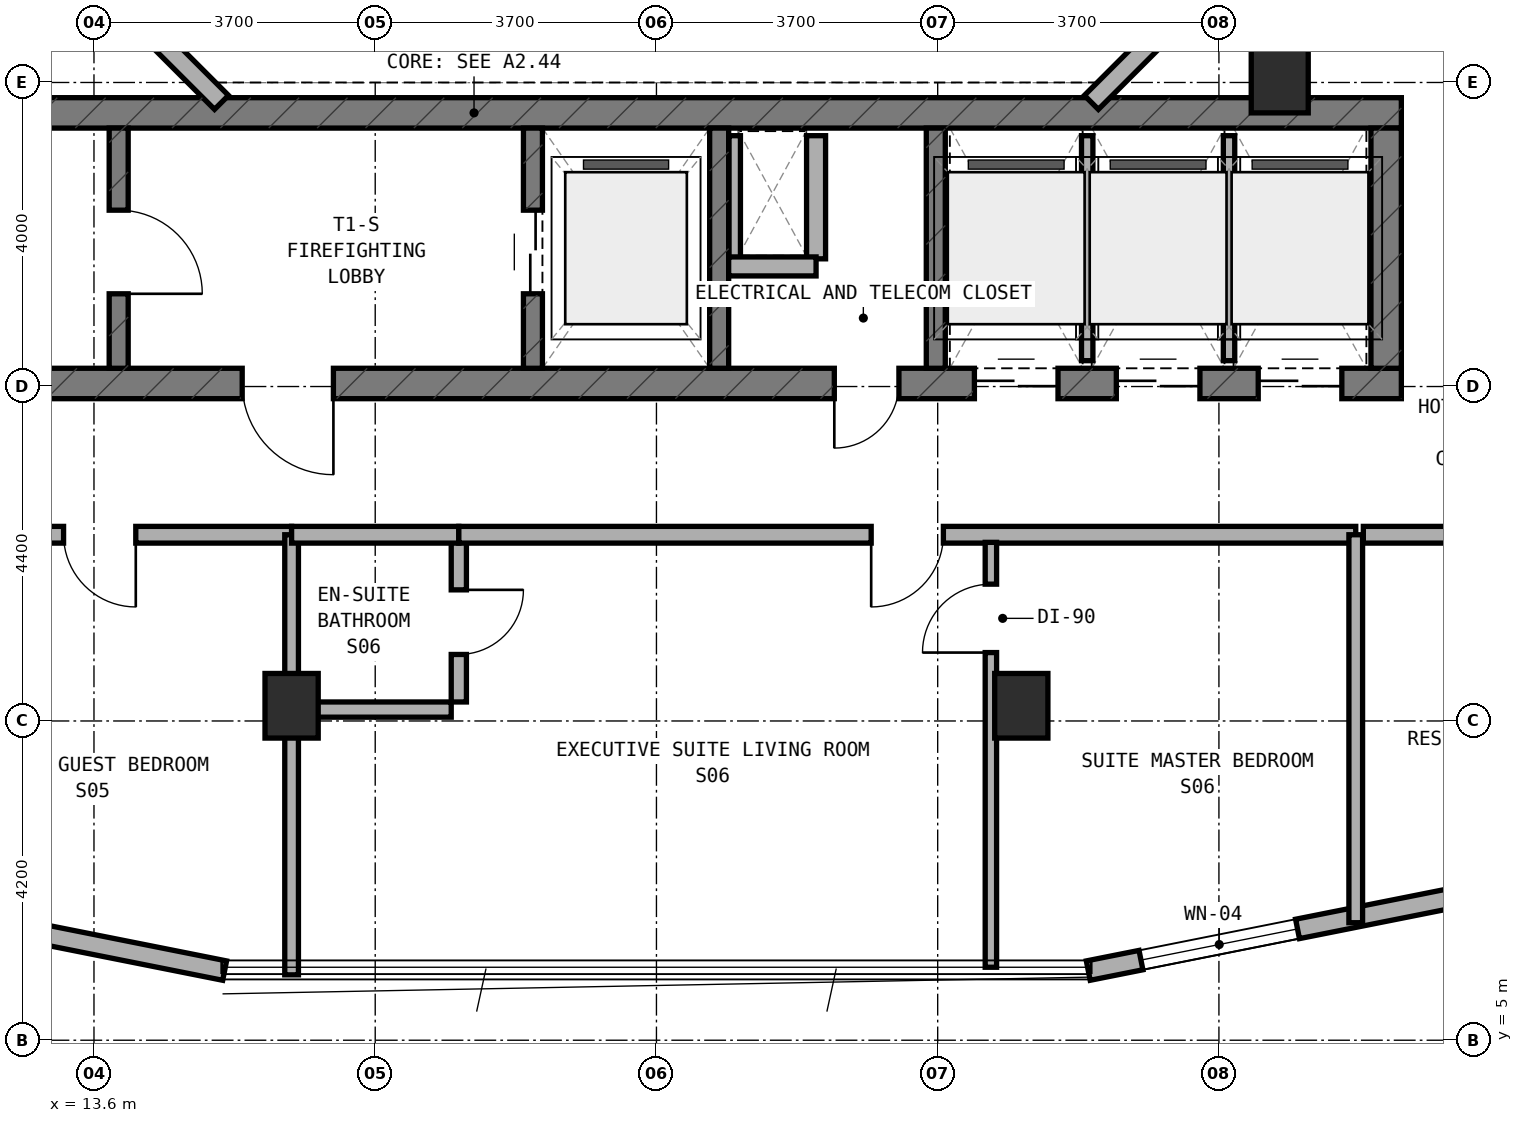
"""IFC4 building model, lengths in metres.
Left out: names, types, materials, properties, quantities, classifications, styles, units other than length and angle.
Written with IfcOpenShell. Run it as: python <this file> out.ifc"""

import sys

from ifc_helpers import new_model, si_unit, direction, frame, frame_2d, origin, origin_2d, place, context, subcontext, project, spatial, rectangle, extrude, element, fill, save


model = new_model("IFC4")
c1 = context("Model", 3, precision=1e-05, world=origin(), true_north=direction((0.0, 1.0)))
c2 = subcontext(c1, "Body", "Model", "MODEL_VIEW")
j1 = project(units=[si_unit("LENGTHUNIT", "METRE"), si_unit("PLANEANGLEUNIT", "RADIAN")], contexts=[c1])
p1 = place(None, origin())
s1 = spatial("IfcSite", under=j1, at=p1, CompositionType="ELEMENT")
p2 = place(p1, origin())
s2 = spatial("IfcBuilding", under=s1, at=p2, CompositionType="ELEMENT")
p3 = place(p2, frame((0.0, 0.0, 202.7)))
s3 = spatial("IfcBuildingStorey", under=s2, at=p3, CompositionType="ELEMENT", Elevation=202.7)
p4 = place(p3, frame((6.4, 13.64, 0.0), z_axis=(0.0, 0.0, 1.0), x_axis=(1.0, 0.0, 0.0)))
e1 = element("IfcWall", 1, at=p4, inside=s3, PredefinedType="SHEAR", context=c2, shape_type="SweptSolid", body=[
    extrude(rectangle(XDim=24.4, YDim=0.4, at=frame_2d((12.2, 0.0))), origin(), (0.0, 0.0, 1.0), 3.6),
])
p5 = place(p4, frame((9.15, 0.0, 0.0)))
e2 = element("IfcOpeningElement", 2, at=p5, cuts=e1, PredefinedType="OPENING", context=c2, shape_type="SweptSolid", body=[
    extrude(rectangle(XDim=1.2, YDim=2.15, at=frame_2d((0.6, 1.075))), frame((0.0, 0.21, 0.0), z_axis=(0.0, -1.0, 0.0), x_axis=(1.0, 0.0, 0.0)), (0.0, 0.0, 1.0), 0.42),
])
p6 = place(p4, frame((16.94, 0.0, 0.0)))
e3 = element("IfcOpeningElement", 3, at=p6, cuts=e1, PredefinedType="OPENING", context=c2, shape_type="SweptSolid", body=[
    extrude(rectangle(XDim=0.85, YDim=2.1, at=frame_2d((0.425, 1.05))), frame((0.0, 0.21, 0.0), z_axis=(0.0, -1.0, 0.0), x_axis=(1.0, 0.0, 0.0)), (0.0, 0.0, 1.0), 0.42),
])
p7 = place(p4, frame((18.783, 0.0, 0.0)))
e4 = element("IfcOpeningElement", 4, at=p7, cuts=e1, PredefinedType="OPENING", context=c2, shape_type="SweptSolid", body=[
    extrude(rectangle(XDim=1.1, YDim=2.15, at=frame_2d((0.55, 1.075))), frame((0.0, 0.21, 0.0), z_axis=(0.0, -1.0, 0.0), x_axis=(1.0, 0.0, 0.0)), (0.0, 0.0, 1.0), 0.42),
])
p8 = place(p4, frame((20.65, 0.0, 0.0)))
e5 = element("IfcOpeningElement", 5, at=p8, cuts=e1, PredefinedType="OPENING", context=c2, shape_type="SweptSolid", body=[
    extrude(rectangle(XDim=1.1, YDim=2.15, at=frame_2d((0.55, 1.075))), frame((0.0, 0.21, 0.0), z_axis=(0.0, -1.0, 0.0), x_axis=(1.0, 0.0, 0.0)), (0.0, 0.0, 1.0), 0.42),
])
p9 = place(p4, frame((22.517, 0.0, 0.0)))
e6 = element("IfcOpeningElement", 6, at=p9, cuts=e1, PredefinedType="OPENING", context=c2, shape_type="SweptSolid", body=[
    extrude(rectangle(XDim=1.1, YDim=2.15, at=frame_2d((0.55, 1.075))), frame((0.0, 0.21, 0.0), z_axis=(0.0, -1.0, 0.0), x_axis=(1.0, 0.0, 0.0)), (0.0, 0.0, 1.0), 0.42),
])
p10 = place(p3, frame((6.4, 17.2, 0.0), z_axis=(0.0, 0.0, 1.0), x_axis=(1.0, 0.0, 0.0)))
e7 = element("IfcWall", 7, at=p10, inside=s3, PredefinedType="SHEAR", context=c2, shape_type="SweptSolid", body=[
    extrude(rectangle(XDim=24.4, YDim=0.4, at=frame_2d((12.2, 0.0))), origin(), (0.0, 0.0, 1.0), 3.6),
])
p11 = place(p3, frame((30.6, 13.84, 0.0), z_axis=(0.0, 0.0, 1.0), x_axis=(0.0, 1.0, 0.0)))
e8 = element("IfcWall", 8, at=p11, inside=s3, PredefinedType="SHEAR", context=c2, shape_type="SweptSolid", body=[
    extrude(rectangle(XDim=3.16, YDim=0.4, at=frame_2d((1.58, 0.0))), origin(), (0.0, 0.0, 1.0), 3.6),
])
p12 = place(p3, frame((13.925, 13.84, 0.0), z_axis=(0.0, 0.0, 1.0), x_axis=(0.0, 1.0, 0.0)))
e9 = element("IfcWall", 9, at=p12, inside=s3, PredefinedType="STANDARD", context=c2, shape_type="SweptSolid", body=[
    extrude(rectangle(XDim=3.16, YDim=0.25, at=frame_2d((1.58, 0.0))), origin(), (0.0, 0.0, 1.0), 3.32),
])
p13 = place(p12, frame((0.98, 0.0, 0.0)))
e10 = element("IfcOpeningElement", 10, at=p13, cuts=e9, PredefinedType="OPENING", context=c2, shape_type="SweptSolid", body=[
    extrude(rectangle(XDim=1.1, YDim=2.15, at=frame_2d((0.55, 1.075))), frame((0.0, 0.135, 0.0), z_axis=(0.0, -1.0, 0.0), x_axis=(1.0, 0.0, 0.0)), (0.0, 0.0, 1.0), 0.27),
])
p14 = place(p3, frame((19.375, 13.84, 0.0), z_axis=(0.0, 0.0, 1.0), x_axis=(0.0, 1.0, 0.0)))
e11 = element("IfcWall", 11, at=p14, inside=s3, PredefinedType="STANDARD", context=c2, shape_type="SweptSolid", body=[
    extrude(rectangle(XDim=3.16, YDim=0.25, at=frame_2d((1.58, 0.0))), origin(), (0.0, 0.0, 1.0), 3.32),
])
p15 = place(p14, frame((0.98, 0.0, 0.0)))
e12 = element("IfcOpeningElement", 12, at=p15, cuts=e11, PredefinedType="OPENING", context=c2, shape_type="SweptSolid", body=[
    extrude(rectangle(XDim=1.1, YDim=2.15, at=frame_2d((0.55, 1.075))), frame((0.0, 0.135, 0.0), z_axis=(0.0, -1.0, 0.0), x_axis=(1.0, 0.0, 0.0)), (0.0, 0.0, 1.0), 0.27),
])
for number, where, z_axis, x_axis in (
    (13, (21.825, 13.84, 0.0), (0.0, 0.0, 1.0), (0.0, 1.0, 0.0)),
    (14, (24.675, 13.84, 0.0), (0.0, 0.0, 1.0), (0.0, 1.0, 0.0)),
):
    element("IfcWall", number, at=place(p3, frame(where, z_axis=z_axis, x_axis=x_axis)), inside=s3, PredefinedType="STANDARD", context=c2, shape_type="SweptSolid", body=[
        extrude(rectangle(XDim=3.16, YDim=0.25, at=frame_2d((1.58, 0.0))), origin(), (0.0, 0.0, 1.0), 3.32),
    ])
for number, where, z_axis, x_axis in (
    (15, (16.2, 9.4, 0.0), (0.0, 0.0, 1.0), (1.0, 0.0, 0.0)),
    (16, (25.8, 9.4, 0.0), (0.0, 0.0, 1.0), (1.0, 0.0, 0.0)),
):
    element("IfcColumn", number, at=place(p3, frame(where, z_axis=z_axis, x_axis=x_axis)), inside=s3, PredefinedType="COLUMN", context=c2, shape_type="SweptSolid", body=[
        extrude(rectangle(XDim=0.7, YDim=0.85, at=origin_2d()), origin(), (0.0, 0.0, 1.0), 3.6),
    ])
p16 = place(p3, frame((29.2, 17.65, 0.0), z_axis=(0.0, 0.0, 1.0), x_axis=(1.0, 0.0, 0.0)))
e17 = element("IfcColumn", 17, at=p16, inside=s3, PredefinedType="COLUMN", context=c2, shape_type="SweptSolid", body=[
    extrude(rectangle(XDim=0.75, YDim=0.9, at=origin_2d()), origin(), (0.0, 0.0, 1.0), 3.6),
])
p17 = place(p3, frame((6.717, 7.629, 0.0), z_axis=(0.0, 0.0, 1.0), x_axis=(0.980745199176, -0.195291715883, 0.0)))
e18 = element("IfcWall", 18, at=p17, inside=s3, PredefinedType="STANDARD", context=c2, shape_type="SweptSolid", body=[
    extrude(rectangle(XDim=8.771, YDim=0.26, at=frame_2d((4.385, 0.0))), origin(), (0.0, 0.0, 1.0), 3.32),
])
p18 = place(p17, frame((3.925, 0.0, 0.85)))
e19 = element("IfcOpeningElement", 19, at=p18, cuts=e18, PredefinedType="OPENING", context=c2, shape_type="SweptSolid", body=[
    extrude(rectangle(XDim=2.1, YDim=1.5, at=frame_2d((1.05, 0.75))), frame((0.0, 0.14, 0.0), z_axis=(0.0, -1.0, 0.0), x_axis=(1.0, 0.0, 0.0)), (0.0, 0.0, 1.0), 0.28),
])
p19 = place(p3, frame((26.681, 5.916, 0.0), z_axis=(0.0, 0.0, 1.0), x_axis=(0.980745199176, 0.195291715883, 0.0)))
e20 = element("IfcWall", 20, at=p19, inside=s3, PredefinedType="STANDARD", context=c2, shape_type="SweptSolid", body=[
    extrude(rectangle(XDim=8.771, YDim=0.26, at=frame_2d((4.385, 0.0))), origin(), (0.0, 0.0, 1.0), 3.32),
])
p20 = place(p19, frame((0.707, 0.0, 0.85)))
e21 = element("IfcOpeningElement", 21, at=p20, cuts=e20, PredefinedType="OPENING", context=c2, shape_type="SweptSolid", body=[
    extrude(rectangle(XDim=2.1, YDim=1.5, at=frame_2d((1.05, 0.75))), frame((0.0, 0.14, 0.0), z_axis=(0.0, -1.0, 0.0), x_axis=(1.0, 0.0, 0.0)), (0.0, 0.0, 1.0), 0.28),
])
p21 = place(p19, frame((5.191, 0.0, 0.85)))
e22 = element("IfcOpeningElement", 22, at=p21, cuts=e20, PredefinedType="OPENING", context=c2, shape_type="SweptSolid", body=[
    extrude(rectangle(XDim=2.1, YDim=1.5, at=frame_2d((1.05, 0.75))), frame((0.0, 0.14, 0.0), z_axis=(0.0, -1.0, 0.0), x_axis=(1.0, 0.0, 0.0)), (0.0, 0.0, 1.0), 0.28),
])
for number, where, z_axis, x_axis in (
    (23, (26.722, 17.338, 0.0), (0.0, 0.0, 1.0), (0.707, 0.707, 0.0)),
    (24, (13.444, 19.172, 0.0), (0.0, 0.0, 1.0), (0.707, -0.707, 0.0)),
):
    element("IfcWall", number, at=place(p3, frame(where, z_axis=z_axis, x_axis=x_axis)), inside=s3, PredefinedType="STANDARD", context=c2, shape_type="SweptSolid", body=[
        extrude(rectangle(XDim=2.594, YDim=0.26, at=frame_2d((1.297, 0.0))), origin(), (0.0, 0.0, 1.0), 3.32),
    ])
p22 = place(p3, frame((22.03, 15.28, 0.0), z_axis=(0.0, 0.0, 1.0), x_axis=(0.0, 1.0, 0.0)))
e25 = element("IfcWall", 25, at=p22, inside=s3, PredefinedType="PARTITIONING", context=c2, shape_type="SweptSolid", body=[
    extrude(rectangle(XDim=1.62, YDim=0.15, at=frame_2d((0.81, 0.0))), origin(), (0.0, 0.0, 1.0), 3.32),
])
p23 = place(p3, frame((23.1, 15.28, 0.0), z_axis=(0.0, 0.0, 1.0), x_axis=(0.0, 1.0, 0.0)))
e26 = element("IfcWall", 26, at=p23, inside=s3, PredefinedType="SOLIDWALL", context=c2, shape_type="SweptSolid", body=[
    extrude(rectangle(XDim=1.62, YDim=0.25, at=frame_2d((0.81, 0.0))), origin(), (0.0, 0.0, 1.0), 3.32),
])
p24 = place(p3, frame((21.95, 15.18, 0.0), z_axis=(0.0, 0.0, 1.0), x_axis=(1.0, 0.0, 0.0)))
e27 = element("IfcWall", 27, at=p24, inside=s3, PredefinedType="SOLIDWALL", context=c2, shape_type="SweptSolid", body=[
    extrude(rectangle(XDim=1.15, YDim=0.25, at=frame_2d((0.575, 0.0))), origin(), (0.0, 0.0, 1.0), 3.32),
])
p25 = place(p3, frame((26.667, 13.94, 0.0), z_axis=(0.0, 0.0, 1.0), x_axis=(0.0, 1.0, 0.0)))
e28 = element("IfcWall", 28, at=p25, inside=s3, PredefinedType="PARTITIONING", context=c2, shape_type="SweptSolid", body=[
    extrude(rectangle(XDim=2.96, YDim=0.15, at=frame_2d((1.48, 0.0))), origin(), (0.0, 0.0, 1.0), 3.32),
])
p26 = place(p3, frame((28.533, 13.94, 0.0), z_axis=(0.0, 0.0, 1.0), x_axis=(0.0, 1.0, 0.0)))
e29 = element("IfcWall", 29, at=p26, inside=s3, PredefinedType="PARTITIONING", context=c2, shape_type="SweptSolid", body=[
    extrude(rectangle(XDim=2.96, YDim=0.15, at=frame_2d((1.48, 0.0))), origin(), (0.0, 0.0, 1.0), 2.695),
])
p27 = place(p3, frame((11.15, 11.65, 0.0), z_axis=(0.0, 0.0, 1.0), x_axis=(1.0, 0.0, 0.0)))
e30 = element("IfcWall", 30, at=p27, inside=s3, PredefinedType="SOLIDWALL", context=c2, shape_type="SweptSolid", body=[
    extrude(rectangle(XDim=5.05, YDim=0.22, at=frame_2d((2.525, 0.0))), origin(), (0.0, 0.0, 1.0), 2.695),
])
p28 = place(p27, frame((2.05, 0.0, 0.0)))
e31 = element("IfcOpeningElement", 31, at=p28, cuts=e30, PredefinedType="OPENING", context=c2, shape_type="SweptSolid", body=[
    extrude(rectangle(XDim=0.95, YDim=2.1, at=frame_2d((0.475, 1.05))), frame((0.0, 0.12, 0.0), z_axis=(0.0, -1.0, 0.0), x_axis=(1.0, 0.0, 0.0)), (0.0, 0.0, 1.0), 0.24),
])
p29 = place(p3, frame((16.2, 5.86, 0.0), z_axis=(0.0, 0.0, 1.0), x_axis=(0.0, 1.0, 0.0)))
e32 = element("IfcWall", 32, at=p29, inside=s3, PredefinedType="SOLIDWALL", context=c2, shape_type="SweptSolid", body=[
    extrude(rectangle(XDim=5.79, YDim=0.18, at=frame_2d((2.895, 0.0))), origin(), (0.0, 0.0, 1.0), 2.695),
])
p30 = place(p3, frame((18.4, 9.45, 0.0), z_axis=(0.0, 0.0, 1.0), x_axis=(0.0, 1.0, 0.0)))
e33 = element("IfcWall", 33, at=p30, inside=s3, PredefinedType="PLUMBINGWALL", context=c2, shape_type="SweptSolid", body=[
    extrude(rectangle(XDim=2.1, YDim=0.2, at=frame_2d((1.05, 0.0))), origin(), (0.0, 0.0, 1.0), 2.845),
])
p31 = place(p30, frame((0.625, 0.0, 0.0)))
e34 = element("IfcOpeningElement", 34, at=p31, cuts=e33, PredefinedType="OPENING", context=c2, shape_type="SweptSolid", body=[
    extrude(rectangle(XDim=0.85, YDim=2.1, at=frame_2d((0.425, 1.05))), frame((0.0, 0.11, 0.0), z_axis=(0.0, -1.0, 0.0), x_axis=(1.0, 0.0, 0.0)), (0.0, 0.0, 1.0), 0.22),
])
p32 = place(p3, frame((16.3, 9.35, 0.0), z_axis=(0.0, 0.0, 1.0), x_axis=(1.0, 0.0, 0.0)))
e35 = element("IfcWall", 35, at=p32, inside=s3, PredefinedType="PLUMBINGWALL", context=c2, shape_type="SweptSolid", body=[
    extrude(rectangle(XDim=2.0, YDim=0.2, at=frame_2d((1.0, 0.0))), origin(), (0.0, 0.0, 1.0), 3.015),
])
p33 = place(p3, frame((16.2, 11.65, 0.0), z_axis=(0.0, 0.0, 1.0), x_axis=(1.0, 0.0, 0.0)))
e36 = element("IfcWall", 36, at=p33, inside=s3, PredefinedType="SOLIDWALL", context=c2, shape_type="SweptSolid", body=[
    extrude(rectangle(XDim=2.2, YDim=0.22, at=frame_2d((1.1, 0.0))), origin(), (0.0, 0.0, 1.0), 2.695),
])
p34 = place(p3, frame((18.4, 11.65, 0.0), z_axis=(0.0, 0.0, 1.0), x_axis=(1.0, 0.0, 0.0)))
e37 = element("IfcWall", 37, at=p34, inside=s3, PredefinedType="SOLIDWALL", context=c2, shape_type="SweptSolid", body=[
    extrude(rectangle(XDim=11.8, YDim=0.22, at=frame_2d((5.9, 0.0))), origin(), (0.0, 0.0, 1.0), 2.695),
])
p35 = place(p34, frame((5.425, 0.0, 0.0)))
e38 = element("IfcOpeningElement", 38, at=p35, cuts=e37, PredefinedType="OPENING", context=c2, shape_type="SweptSolid", body=[
    extrude(rectangle(XDim=0.95, YDim=2.1, at=frame_2d((0.475, 1.05))), frame((0.0, 0.12, 0.0), z_axis=(0.0, -1.0, 0.0), x_axis=(1.0, 0.0, 0.0)), (0.0, 0.0, 1.0), 0.24),
])
p36 = place(p3, frame((25.4, 5.96, 0.0), z_axis=(0.0, 0.0, 1.0), x_axis=(0.0, 1.0, 0.0)))
e39 = element("IfcWall", 39, at=p36, inside=s3, PredefinedType="PARTITIONING", context=c2, shape_type="SweptSolid", body=[
    extrude(rectangle(XDim=5.59, YDim=0.15, at=frame_2d((2.795, 0.0))), origin(), (0.0, 0.0, 1.0), 2.845),
])
p37 = place(p36, frame((4.14, 0.0, 0.0)))
e40 = element("IfcOpeningElement", 40, at=p37, cuts=e39, PredefinedType="OPENING", context=c2, shape_type="SweptSolid", body=[
    extrude(rectangle(XDim=0.9, YDim=2.1, at=frame_2d((0.45, 1.05))), frame((0.0, 0.085, 0.0), z_axis=(0.0, -1.0, 0.0), x_axis=(1.0, 0.0, 0.0)), (0.0, 0.0, 1.0), 0.17),
])
p38 = place(p3, frame((30.2, 6.546, 0.0), z_axis=(0.0, 0.0, 1.0), x_axis=(0.0, 1.0, 0.0)))
e41 = element("IfcWall", 41, at=p38, inside=s3, PredefinedType="SOLIDWALL", context=c2, shape_type="SweptSolid", body=[
    extrude(rectangle(XDim=5.104, YDim=0.18, at=frame_2d((2.552, 0.0))), origin(), (0.0, 0.0, 1.0), 2.845),
])
p39 = place(p3, frame((30.3, 11.65, 0.0), z_axis=(0.0, 0.0, 1.0), x_axis=(1.0, 0.0, 0.0)))
e42 = element("IfcWall", 42, at=p39, inside=s3, PredefinedType="SOLIDWALL", context=c2, shape_type="SweptSolid", body=[
    extrude(rectangle(XDim=9.64, YDim=0.22, at=frame_2d((4.82, 0.0))), origin(), (0.0, 0.0, 1.0), 2.695),
])
p40 = place(p39, frame((4.461, 0.0, 0.0)))
e43 = element("IfcOpeningElement", 43, at=p40, cuts=e42, PredefinedType="OPENING", context=c2, shape_type="SweptSolid", body=[
    extrude(rectangle(XDim=0.95, YDim=2.1, at=frame_2d((0.475, 1.05))), frame((0.0, 0.12, 0.0), z_axis=(0.0, -1.0, 0.0), x_axis=(1.0, 0.0, 0.0)), (0.0, 0.0, 1.0), 0.24),
])
p41 = place(p20, origin())
e44 = element("IfcWindow", 44, at=p41, inside=s3, PartitioningType="SINGLE_PANEL", PredefinedType="WINDOW", context=c2, shape_type="SweptSolid", body=[
    extrude(rectangle(XDim=2.1, YDim=1.5, at=frame_2d((1.05, 0.75))), frame((0.0, 0.03, 0.0), z_axis=(0.0, -1.0, 0.0), x_axis=(1.0, 0.0, 0.0)), (0.0, 0.0, 1.0), 0.06),
])
fill(e21, e44)
p42 = place(p13, frame((1.1, 0.0, 0.0), z_axis=(0.0, 0.0, 1.0), x_axis=(-1.0, 0.0, 0.0)))
e45 = element("IfcDoor", 45, at=p42, inside=s3, OperationType="SINGLE_SWING_RIGHT", PredefinedType="DOOR", context=c2, shape_type="SweptSolid", body=[
    extrude(rectangle(XDim=1.1, YDim=2.15, at=frame_2d((0.55, 1.075))), frame((0.0, 0.025, 0.0), z_axis=(0.0, -1.0, 0.0), x_axis=(1.0, 0.0, 0.0)), (0.0, 0.0, 1.0), 0.05),
])
fill(e10, e45)
p43 = place(p5, frame((1.2, 0.0, 0.0), z_axis=(0.0, 0.0, 1.0), x_axis=(-1.0, 0.0, 0.0)))
e46 = element("IfcDoor", 46, at=p43, inside=s3, OperationType="SINGLE_SWING_LEFT", PredefinedType="DOOR", context=c2, shape_type="SweptSolid", body=[
    extrude(rectangle(XDim=1.2, YDim=2.15, at=frame_2d((0.6, 1.075))), frame((0.0, 0.025, 0.0), z_axis=(0.0, -1.0, 0.0), x_axis=(1.0, 0.0, 0.0)), (0.0, 0.0, 1.0), 0.05),
])
fill(e2, e46)
p44 = place(p15, origin())
e47 = element("IfcDoor", 47, at=p44, inside=s3, OperationType="DOUBLE_DOOR_SLIDING", PredefinedType="DOOR", context=c2, shape_type="SweptSolid", body=[
    extrude(rectangle(XDim=1.1, YDim=2.15, at=frame_2d((0.55, 1.075))), frame((0.0, 0.025, 0.0), z_axis=(0.0, -1.0, 0.0), x_axis=(1.0, 0.0, 0.0)), (0.0, 0.0, 1.0), 0.05),
])
fill(e12, e47)
p45 = place(p6, frame((0.85, 0.0, 0.0), z_axis=(0.0, 0.0, 1.0), x_axis=(-1.0, 0.0, 0.0)))
e48 = element("IfcDoor", 48, at=p45, inside=s3, OperationType="SINGLE_SWING_RIGHT", PredefinedType="DOOR", context=c2, shape_type="SweptSolid", body=[
    extrude(rectangle(XDim=0.85, YDim=2.1, at=frame_2d((0.425, 1.05))), frame((0.0, 0.025, 0.0), z_axis=(0.0, -1.0, 0.0), x_axis=(1.0, 0.0, 0.0)), (0.0, 0.0, 1.0), 0.05),
])
fill(e3, e48)
p46 = place(p7, frame((1.1, 0.0, 0.0), z_axis=(0.0, 0.0, 1.0), x_axis=(-1.0, 0.0, 0.0)))
e49 = element("IfcDoor", 49, at=p46, inside=s3, OperationType="DOUBLE_DOOR_SLIDING", PredefinedType="DOOR", context=c2, shape_type="SweptSolid", body=[
    extrude(rectangle(XDim=1.1, YDim=2.15, at=frame_2d((0.55, 1.075))), frame((0.0, 0.025, 0.0), z_axis=(0.0, -1.0, 0.0), x_axis=(1.0, 0.0, 0.0)), (0.0, 0.0, 1.0), 0.05),
])
fill(e4, e49)
p47 = place(p8, frame((1.1, 0.0, 0.0), z_axis=(0.0, 0.0, 1.0), x_axis=(-1.0, 0.0, 0.0)))
e50 = element("IfcDoor", 50, at=p47, inside=s3, OperationType="DOUBLE_DOOR_SLIDING", PredefinedType="DOOR", context=c2, shape_type="SweptSolid", body=[
    extrude(rectangle(XDim=1.1, YDim=2.15, at=frame_2d((0.55, 1.075))), frame((0.0, 0.025, 0.0), z_axis=(0.0, -1.0, 0.0), x_axis=(1.0, 0.0, 0.0)), (0.0, 0.0, 1.0), 0.05),
])
fill(e5, e50)
p48 = place(p9, frame((1.1, 0.0, 0.0), z_axis=(0.0, 0.0, 1.0), x_axis=(-1.0, 0.0, 0.0)))
e51 = element("IfcDoor", 51, at=p48, inside=s3, OperationType="DOUBLE_DOOR_SLIDING", PredefinedType="DOOR", context=c2, shape_type="SweptSolid", body=[
    extrude(rectangle(XDim=1.1, YDim=2.15, at=frame_2d((0.55, 1.075))), frame((0.0, 0.025, 0.0), z_axis=(0.0, -1.0, 0.0), x_axis=(1.0, 0.0, 0.0)), (0.0, 0.0, 1.0), 0.05),
])
fill(e6, e51)
p49 = place(p28, frame((0.95, 0.0, 0.0), z_axis=(0.0, 0.0, 1.0), x_axis=(-1.0, 0.0, 0.0)))
e52 = element("IfcDoor", 52, at=p49, inside=s3, OperationType="SINGLE_SWING_LEFT", PredefinedType="DOOR", context=c2, shape_type="SweptSolid", body=[
    extrude(rectangle(XDim=0.95, YDim=2.1, at=frame_2d((0.475, 1.05))), frame((0.0, 0.025, 0.0), z_axis=(0.0, -1.0, 0.0), x_axis=(1.0, 0.0, 0.0)), (0.0, 0.0, 1.0), 0.05),
])
fill(e31, e52)
p50 = place(p31, frame((0.85, 0.0, 0.0), z_axis=(0.0, 0.0, 1.0), x_axis=(-1.0, 0.0, 0.0)))
e53 = element("IfcDoor", 53, at=p50, inside=s3, OperationType="SINGLE_SWING_LEFT", PredefinedType="DOOR", context=c2, shape_type="SweptSolid", body=[
    extrude(rectangle(XDim=0.85, YDim=2.1, at=frame_2d((0.425, 1.05))), frame((0.0, 0.025, 0.0), z_axis=(0.0, -1.0, 0.0), x_axis=(1.0, 0.0, 0.0)), (0.0, 0.0, 1.0), 0.05),
])
fill(e34, e53)
p51 = place(p35, frame((0.95, 0.0, 0.0), z_axis=(0.0, 0.0, 1.0), x_axis=(-1.0, 0.0, 0.0)))
e54 = element("IfcDoor", 54, at=p51, inside=s3, OperationType="SINGLE_SWING_RIGHT", PredefinedType="DOOR", context=c2, shape_type="SweptSolid", body=[
    extrude(rectangle(XDim=0.95, YDim=2.1, at=frame_2d((0.475, 1.05))), frame((0.0, 0.025, 0.0), z_axis=(0.0, -1.0, 0.0), x_axis=(1.0, 0.0, 0.0)), (0.0, 0.0, 1.0), 0.05),
])
fill(e38, e54)
p52 = place(p37, origin())
e55 = element("IfcDoor", 55, at=p52, inside=s3, OperationType="SINGLE_SWING_LEFT", PredefinedType="DOOR", context=c2, shape_type="SweptSolid", body=[
    extrude(rectangle(XDim=0.9, YDim=2.1, at=frame_2d((0.45, 1.05))), frame((0.0, 0.025, 0.0), z_axis=(0.0, -1.0, 0.0), x_axis=(1.0, 0.0, 0.0)), (0.0, 0.0, 1.0), 0.05),
])
fill(e40, e55)
save(model, sys.argv[1])
